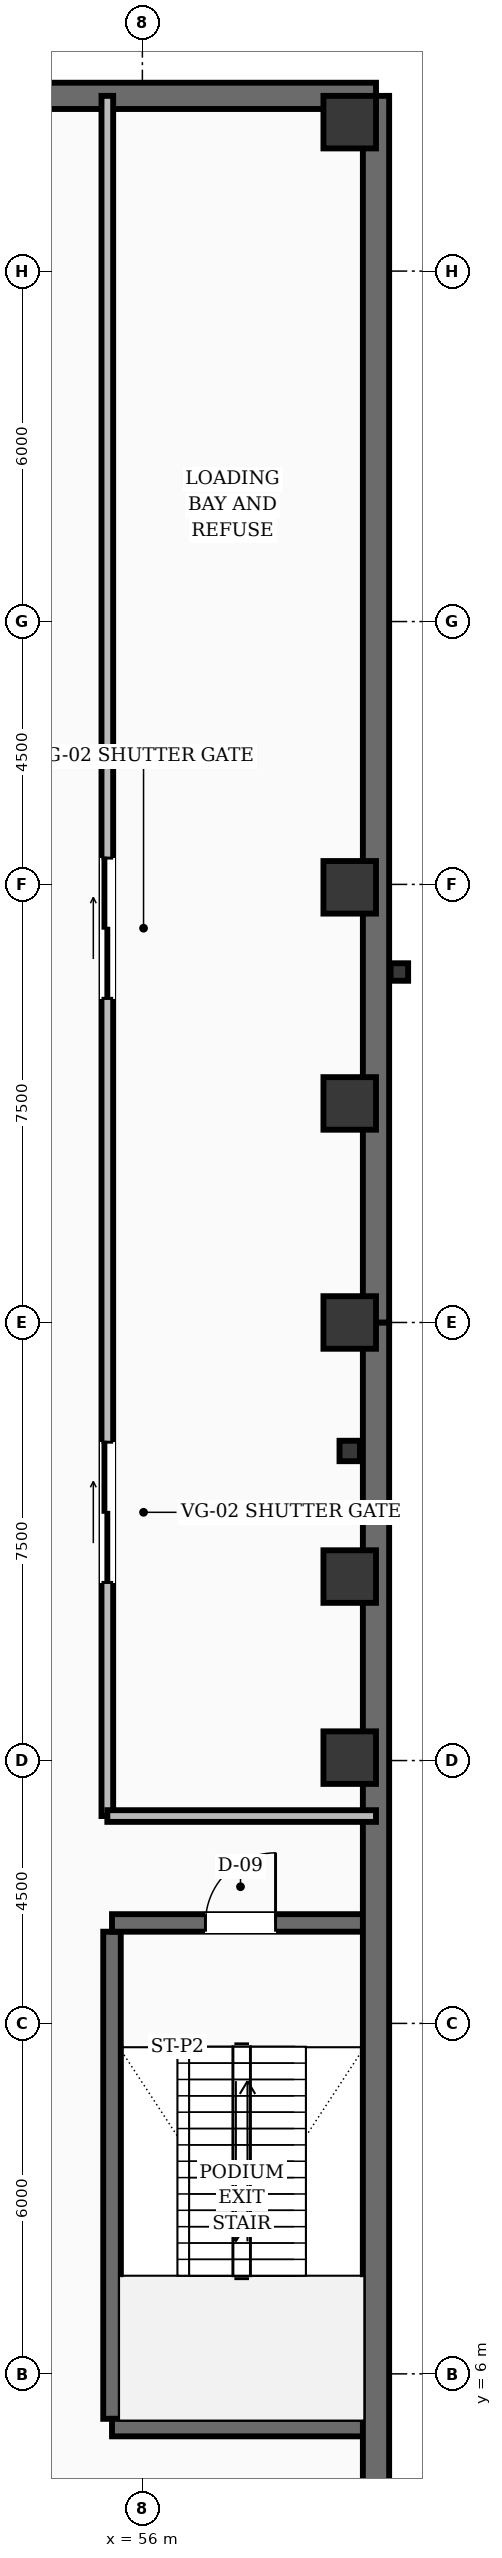
"""IFC4 building model, lengths in metres.
Left out: names, types, materials, properties, quantities, classifications, styles, units other than length and angle.
Written with IfcOpenShell. Run it as: python <this file> out.ifc"""

import sys

from ifc_helpers import new_model, si_unit, direction, frame, frame_2d, origin, origin_2d, place, context, subcontext, project, spatial, rectangle, hollow_rectangle, i_section, extrude, element, fill, save


model = new_model("IFC4")
c1 = context("Model", 3, precision=1e-05, world=origin(), true_north=direction((0.0, 1.0)))
c2 = subcontext(c1, "Body", "Model", "MODEL_VIEW")
j1 = project(units=[si_unit("LENGTHUNIT", "METRE"), si_unit("PLANEANGLEUNIT", "RADIAN")], contexts=[c1])
p1 = place(None, origin())
s1 = spatial("IfcSite", under=j1, at=p1, CompositionType="ELEMENT")
p2 = place(p1, origin())
s2 = spatial("IfcBuilding", under=s1, at=p2, CompositionType="ELEMENT")
p3 = place(p2, frame((0.0, 0.0, -5.2)))
s3 = spatial("IfcBuildingStorey", under=s2, at=p3, CompositionType="ELEMENT", Elevation=-5.2)
p4 = place(p3, frame((55.48, 5.23, 0.0), z_axis=(0.0, 0.0, 1.0), x_axis=(0.0, 1.0, 0.0)))
e1 = element("IfcWall", 1, at=p4, inside=s3, PredefinedType="SHEAR", context=c2, shape_type="SweptSolid", body=[
    extrude(rectangle(XDim=8.34, YDim=0.3, at=frame_2d((4.17, 0.0))), origin(), (0.0, 0.0, 1.0), 5.2),
])
p5 = place(p3, frame((55.48, 5.08, 0.0), z_axis=(0.0, 0.0, 1.0), x_axis=(1.0, 0.0, 0.0)))
e2 = element("IfcWall", 2, at=p5, inside=s3, PredefinedType="SHEAR", context=c2, shape_type="SweptSolid", body=[
    extrude(rectangle(XDim=4.44, YDim=0.3, at=frame_2d((2.22, 0.0))), origin(), (0.0, 0.0, 1.0), 5.2),
])
p6 = place(p3, frame((55.48, 13.72, 0.0), z_axis=(0.0, 0.0, 1.0), x_axis=(1.0, 0.0, 0.0)))
e3 = element("IfcWall", 3, at=p6, inside=s3, PredefinedType="SHEAR", context=c2, shape_type="SweptSolid", body=[
    extrude(rectangle(XDim=4.44, YDim=0.3, at=frame_2d((2.22, 0.0))), origin(), (0.0, 0.0, 1.0), 5.2),
])
p7 = place(p6, frame((1.6, 0.0, 0.0)))
e4 = element("IfcOpeningElement", 4, at=p7, cuts=e3, PredefinedType="OPENING", context=c2, shape_type="SweptSolid", body=[
    extrude(rectangle(XDim=1.2, YDim=2.1, at=frame_2d((0.6, 1.05))), frame((0.0, 0.16, 0.0), z_axis=(0.0, -1.0, 0.0), x_axis=(1.0, 0.0, 0.0)), (0.0, 0.0, 1.0), 0.32),
])
for number, where, z_axis, x_axis in (
    (5, (60.0, 3.0, 0.0), (0.0, 0.0, 1.0), (0.0, 1.0, 0.0)),
    (6, (60.0, 24.0, 0.0), (0.0, 0.0, 1.0), (0.0, 1.0, 0.0)),
):
    element("IfcWall", number, at=place(p3, frame(where, z_axis=z_axis, x_axis=x_axis)), inside=s3, PredefinedType="USERDEFINED", context=c2, shape_type="SweptSolid", body=[
        extrude(rectangle(XDim=21.0, YDim=0.45, at=frame_2d((10.5, 0.0))), origin(), (0.0, 0.0, 1.0), 5.2),
    ])
p8 = place(p3, frame((60.0, 45.0, 0.0), z_axis=(0.0, 0.0, 1.0), x_axis=(-1.0, 0.0, 0.0)))
e7 = element("IfcWall", 7, at=p8, inside=s3, PredefinedType="USERDEFINED", context=c2, shape_type="SweptSolid", body=[
    extrude(rectangle(XDim=28.0, YDim=0.45, at=frame_2d((14.0, 0.0))), origin(), (0.0, 0.0, 1.0), 5.2),
])
for number, where, z_axis, x_axis in (
    (8, (59.55, 44.55, 0.0), (0.0, 0.0, 1.0), (1.0, 0.0, 0.0)),
    (9, (59.55, 16.55, 0.0), (0.0, 0.0, 1.0), (1.0, 0.0, 0.0)),
    (10, (59.55, 19.65, 0.0), (0.0, 0.0, 1.0), (1.0, 0.0, 0.0)),
    (11, (59.55, 24.0, 0.0), (0.0, 0.0, 1.0), (1.0, 0.0, 0.0)),
    (12, (59.55, 27.75, 0.0), (0.0, 0.0, 1.0), (1.0, 0.0, 0.0)),
    (13, (59.55, 31.45, 0.0), (0.0, 0.0, 1.0), (1.0, 0.0, 0.0)),
):
    element("IfcColumn", number, at=place(p3, frame(where, z_axis=z_axis, x_axis=x_axis)), inside=s3, PredefinedType="COLUMN", context=c2, shape_type="SweptSolid", body=[
        extrude(rectangle(XDim=0.9, YDim=0.9, at=origin_2d()), origin(), (0.0, 0.0, 1.0), 5.2),
    ])
p9 = place(p3, frame((59.55, 21.8, 0.0), z_axis=(0.0, 0.0, 1.0), x_axis=(1.0, 0.0, 0.0)))
e14 = element("IfcColumn", 14, at=p9, inside=s3, PredefinedType="PILASTER", context=c2, shape_type="SweptSolid", body=[
    extrude(hollow_rectangle(XDim=0.35, YDim=0.35, WallThickness=0.016, at=origin_2d()), origin(), (0.0, 0.0, 1.0), 5.2),
])
p10 = place(p3, frame((60.4, 30.0, 0.0), z_axis=(0.0, 0.0, 1.0), x_axis=(1.0, 0.0, 0.0)))
e15 = element("IfcColumn", 15, at=p10, inside=s3, PredefinedType="COLUMN", context=c2, shape_type="SweptSolid", body=[
    extrude(i_section(OverallWidth=0.3, OverallDepth=0.3, WebThickness=0.01, FlangeThickness=0.015, FilletRadius=0.013, at=origin_2d()), origin(), (0.0, 0.0, 1.0), 4.95),
])
p11 = place(p3, frame((55.4, 15.55, 0.0), z_axis=(0.0, 0.0, 1.0), x_axis=(0.0, 1.0, 0.0)))
e16 = element("IfcWall", 16, at=p11, inside=s3, PredefinedType="SOLIDWALL", context=c2, shape_type="SweptSolid", body=[
    extrude(rectangle(XDim=29.45, YDim=0.2, at=frame_2d((14.725, 0.0))), origin(), (0.0, 0.0, 1.0), 3.92),
])
p12 = place(p11, frame((4.0, 0.0, 0.0)))
e17 = element("IfcOpeningElement", 17, at=p12, cuts=e16, PredefinedType="OPENING", context=c2, shape_type="SweptSolid", body=[
    extrude(rectangle(XDim=2.4, YDim=2.2, at=frame_2d((1.2, 1.1))), frame((0.0, 0.11, 0.0), z_axis=(0.0, -1.0, 0.0), x_axis=(1.0, 0.0, 0.0)), (0.0, 0.0, 1.0), 0.22),
])
p13 = place(p11, frame((14.0, 0.0, 0.0)))
e18 = element("IfcOpeningElement", 18, at=p13, cuts=e16, PredefinedType="OPENING", context=c2, shape_type="SweptSolid", body=[
    extrude(rectangle(XDim=2.4, YDim=2.2, at=frame_2d((1.2, 1.1))), frame((0.0, 0.11, 0.0), z_axis=(0.0, -1.0, 0.0), x_axis=(1.0, 0.0, 0.0)), (0.0, 0.0, 1.0), 0.22),
])
p14 = place(p3, frame((55.4, 15.55, 0.0), z_axis=(0.0, 0.0, 1.0), x_axis=(1.0, 0.0, 0.0)))
e19 = element("IfcWall", 19, at=p14, inside=s3, PredefinedType="SOLIDWALL", context=c2, shape_type="SweptSolid", body=[
    extrude(rectangle(XDim=4.6, YDim=0.2, at=frame_2d((2.3, 0.0))), origin(), (0.0, 0.0, 1.0), 3.92),
])
p15 = place(p7, origin())
e20 = element("IfcDoor", 20, at=p15, inside=s3, OperationType="SINGLE_SWING_RIGHT", PredefinedType="DOOR", context=c2, shape_type="SweptSolid", body=[
    extrude(rectangle(XDim=1.2, YDim=2.1, at=frame_2d((0.6, 1.05))), frame((0.0, 0.025, 0.0), z_axis=(0.0, -1.0, 0.0), x_axis=(1.0, 0.0, 0.0)), (0.0, 0.0, 1.0), 0.05),
])
fill(e4, e20)
p16 = place(p12, origin())
e21 = element("IfcDoor", 21, at=p16, inside=s3, OperationType="ROLLINGUP", PredefinedType="GATE", context=c2, shape_type="SweptSolid", body=[
    extrude(rectangle(XDim=2.4, YDim=2.2, at=frame_2d((1.2, 1.1))), frame((0.0, 0.025, 0.0), z_axis=(0.0, -1.0, 0.0), x_axis=(1.0, 0.0, 0.0)), (0.0, 0.0, 1.0), 0.05),
])
fill(e17, e21)
p17 = place(p13, origin())
e22 = element("IfcDoor", 22, at=p17, inside=s3, OperationType="ROLLINGUP", PredefinedType="GATE", context=c2, shape_type="SweptSolid", body=[
    extrude(rectangle(XDim=2.4, YDim=2.2, at=frame_2d((1.2, 1.1))), frame((0.0, 0.025, 0.0), z_axis=(0.0, -1.0, 0.0), x_axis=(1.0, 0.0, 0.0)), (0.0, 0.0, 1.0), 0.05),
])
fill(e18, e22)
save(model, sys.argv[1])
